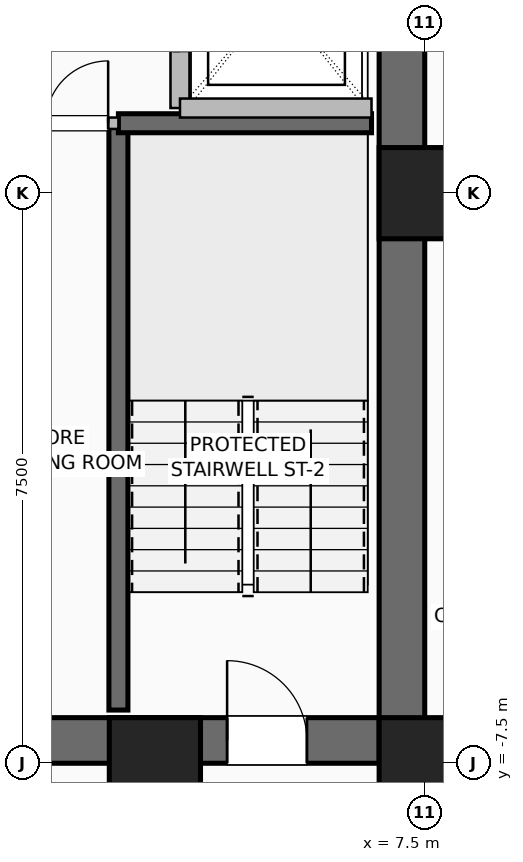
"""IFC4 building model, lengths in metres.
Left out: names, types, materials, properties, quantities, classifications, styles, units other than length and angle.
Written with IfcOpenShell. Run it as: python <this file> out.ifc"""

import sys

from ifc_helpers import new_model, si_unit, direction, frame, frame_2d, origin, origin_2d, place, context, subcontext, project, spatial, rectangle, hollow_rectangle, extrude, element, fill, save


model = new_model("IFC4")
c1 = context("Model", 3, precision=1e-05, world=origin(), true_north=direction((0.0, 1.0)))
c2 = subcontext(c1, "Body", "Model", "MODEL_VIEW")
j1 = project(units=[si_unit("LENGTHUNIT", "METRE"), si_unit("PLANEANGLEUNIT", "RADIAN")], contexts=[c1])
p1 = place(None, origin())
s1 = spatial("IfcSite", under=j1, at=p1, CompositionType="ELEMENT")
p2 = place(p1, origin())
s2 = spatial("IfcBuilding", under=s1, at=p2, CompositionType="ELEMENT")
p3 = place(p2, frame((0.0, 0.0, 48.0)))
s3 = spatial("IfcBuildingStorey", under=s2, at=p3, CompositionType="ELEMENT", Elevation=48.0)
for number, where, z_axis, x_axis in (
    (1, (3.95, -7.5, 0.0), (0.0, 0.0, 1.0), (1.0, 0.0, 0.0)),
    (2, (7.5, -7.5, 0.0), (0.0, 0.0, 1.0), (1.0, 0.0, 0.0)),
    (3, (7.5, 0.0, 0.0), (0.0, 0.0, 1.0), (1.0, 0.0, 0.0)),
):
    element("IfcColumn", number, at=place(p3, frame(where, z_axis=z_axis, x_axis=x_axis)), inside=s3, PredefinedType="COLUMN", context=c2, shape_type="SweptSolid", body=[
        extrude(hollow_rectangle(XDim=1.2, YDim=1.2, WallThickness=0.055, at=origin_2d()), origin(), (0.0, 0.0, 1.0), 3.5),
    ])
p4 = place(p3, frame((-7.5, -7.2, 0.0), z_axis=(0.0, 0.0, 1.0), x_axis=(1.0, 0.0, 0.0)))
e4 = element("IfcWall", 4, at=p4, inside=s3, PredefinedType="SHEAR", context=c2, shape_type="SweptSolid", body=[
    extrude(rectangle(XDim=15.0, YDim=0.6, at=frame_2d((7.5, 0.0))), origin(), (0.0, 0.0, 1.0), 3.25),
])
p5 = place(p4, frame((1.55, 0.0, 0.0)))
e5 = element("IfcOpeningElement", 5, at=p5, cuts=e4, PredefinedType="OPENING", context=c2, shape_type="SweptSolid", body=[
    extrude(rectangle(XDim=1.05, YDim=2.08, at=frame_2d((0.525, 1.04))), frame((0.0, 0.31, 0.0), z_axis=(0.0, -1.0, 0.0), x_axis=(1.0, 0.0, 0.0)), (0.0, 0.0, 1.0), 0.62),
])
p6 = place(p4, frame((12.4, 0.0, 0.0)))
e6 = element("IfcOpeningElement", 6, at=p6, cuts=e4, PredefinedType="OPENING", context=c2, shape_type="SweptSolid", body=[
    extrude(rectangle(XDim=1.05, YDim=2.08, at=frame_2d((0.525, 1.04))), frame((0.0, 0.31, 0.0), z_axis=(0.0, -1.0, 0.0), x_axis=(1.0, 0.0, 0.0)), (0.0, 0.0, 1.0), 0.62),
])
p7 = place(p4, frame((4.64, 0.0, 0.0)))
e7 = element("IfcOpeningElement", 7, at=p7, cuts=e4, PredefinedType="OPENING", context=c2, shape_type="SweptSolid", body=[
    extrude(rectangle(XDim=1.1, YDim=2.2, at=frame_2d((0.55, 1.1))), frame((0.0, 0.31, 0.0), z_axis=(0.0, -1.0, 0.0), x_axis=(1.0, 0.0, 0.0)), (0.0, 0.0, 1.0), 0.62),
])
p8 = place(p4, frame((6.52, 0.0, 0.0)))
e8 = element("IfcOpeningElement", 8, at=p8, cuts=e4, PredefinedType="OPENING", context=c2, shape_type="SweptSolid", body=[
    extrude(rectangle(XDim=1.1, YDim=2.2, at=frame_2d((0.55, 1.1))), frame((0.0, 0.31, 0.0), z_axis=(0.0, -1.0, 0.0), x_axis=(1.0, 0.0, 0.0)), (0.0, 0.0, 1.0), 0.62),
])
p9 = place(p4, frame((8.4, 0.0, 0.0)))
e9 = element("IfcOpeningElement", 9, at=p9, cuts=e4, PredefinedType="OPENING", context=c2, shape_type="SweptSolid", body=[
    extrude(rectangle(XDim=1.1, YDim=2.2, at=frame_2d((0.55, 1.1))), frame((0.0, 0.31, 0.0), z_axis=(0.0, -1.0, 0.0), x_axis=(1.0, 0.0, 0.0)), (0.0, 0.0, 1.0), 0.62),
])
p10 = place(p3, frame((7.2, -7.5, 0.0), z_axis=(0.0, 0.0, 1.0), x_axis=(0.0, 1.0, 0.0)))
e10 = element("IfcWall", 10, at=p10, inside=s3, PredefinedType="SHEAR", context=c2, shape_type="SweptSolid", body=[
    extrude(rectangle(XDim=15.0, YDim=0.6, at=frame_2d((7.5, 0.0))), origin(), (0.0, 0.0, 1.0), 3.25),
])
p11 = place(p3, frame((3.47, -6.8, 0.0), z_axis=(0.0, 0.0, 1.0), x_axis=(0.0, 1.0, 0.0)))
e11 = element("IfcWall", 11, at=p11, inside=s3, PredefinedType="SHEAR", context=c2, shape_type="SweptSolid", body=[
    extrude(rectangle(XDim=7.72, YDim=0.25, at=frame_2d((3.86, 0.0))), origin(), (0.0, 0.0, 1.0), 3.25),
])
p12 = place(p3, frame((3.47, 0.92, 0.0), z_axis=(0.0, 0.0, 1.0), x_axis=(1.0, 0.0, 0.0)))
e12 = element("IfcWall", 12, at=p12, inside=s3, PredefinedType="SHEAR", context=c2, shape_type="SweptSolid", body=[
    extrude(rectangle(XDim=3.33, YDim=0.25, at=frame_2d((1.665, 0.0))), origin(), (0.0, 0.0, 1.0), 3.25),
])
p13 = place(p3, frame((4.28, 1.12, 0.0), z_axis=(0.0, 0.0, 1.0), x_axis=(0.0, 1.0, 0.0)))
e13 = element("IfcWall", 13, at=p13, inside=s3, PredefinedType="SHEAR", context=c2, shape_type="SweptSolid", body=[
    extrude(rectangle(XDim=2.9, YDim=0.25, at=frame_2d((1.45, 0.0))), origin(), (0.0, 0.0, 1.0), 3.25),
])
p14 = place(p13, frame((0.75, 0.0, 0.0)))
e14 = element("IfcOpeningElement", 14, at=p14, cuts=e13, PredefinedType="OPENING", context=c2, shape_type="SweptSolid", body=[
    extrude(rectangle(XDim=1.3, YDim=2.3, at=frame_2d((0.65, 1.15))), frame((0.0, 0.135, 0.0), z_axis=(0.0, -1.0, 0.0), x_axis=(1.0, 0.0, 0.0)), (0.0, 0.0, 1.0), 0.27),
])
p15 = place(p3, frame((4.28, 1.12, 0.0), z_axis=(0.0, 0.0, 1.0), x_axis=(1.0, 0.0, 0.0)))
e15 = element("IfcWall", 15, at=p15, inside=s3, PredefinedType="SHEAR", context=c2, shape_type="SweptSolid", body=[
    extrude(rectangle(XDim=2.52, YDim=0.25, at=frame_2d((1.26, 0.0))), origin(), (0.0, 0.0, 1.0), 3.25),
])
p16 = place(p3, frame((2.38, 0.92, 0.0), z_axis=(0.0, 0.0, 1.0), x_axis=(1.0, 0.0, 0.0)))
e16 = element("IfcWall", 16, at=p16, inside=s3, PredefinedType="PARTITIONING", context=c2, shape_type="SweptSolid", body=[
    extrude(rectangle(XDim=1.09, YDim=0.15, at=frame_2d((0.545, 0.0))), origin(), (0.0, 0.0, 1.0), 3.25),
])
p17 = place(p16, frame((0.135, 0.0, 0.0)))
e17 = element("IfcOpeningElement", 17, at=p17, cuts=e16, PredefinedType="OPENING", context=c2, shape_type="SweptSolid", body=[
    extrude(rectangle(XDim=0.82, YDim=2.05, at=frame_2d((0.41, 1.025))), frame((0.0, 0.085, 0.0), z_axis=(0.0, -1.0, 0.0), x_axis=(1.0, 0.0, 0.0)), (0.0, 0.0, 1.0), 0.17),
])
p18 = place(p6, origin())
e18 = element("IfcDoor", 18, at=p18, inside=s3, OperationType="SINGLE_SWING_LEFT", PredefinedType="DOOR", context=c2, shape_type="SweptSolid", body=[
    extrude(rectangle(XDim=1.05, YDim=2.08, at=frame_2d((0.525, 1.04))), frame((0.0, 0.025, 0.0), z_axis=(0.0, -1.0, 0.0), x_axis=(1.0, 0.0, 0.0)), (0.0, 0.0, 1.0), 0.05),
])
fill(e6, e18)
p19 = place(p17, origin())
e19 = element("IfcDoor", 19, at=p19, inside=s3, OperationType="SINGLE_SWING_RIGHT", PredefinedType="DOOR", context=c2, shape_type="SweptSolid", body=[
    extrude(rectangle(XDim=0.82, YDim=2.05, at=frame_2d((0.41, 1.025))), frame((0.0, 0.025, 0.0), z_axis=(0.0, -1.0, 0.0), x_axis=(1.0, 0.0, 0.0)), (0.0, 0.0, 1.0), 0.05),
])
fill(e17, e19)
save(model, sys.argv[1])
